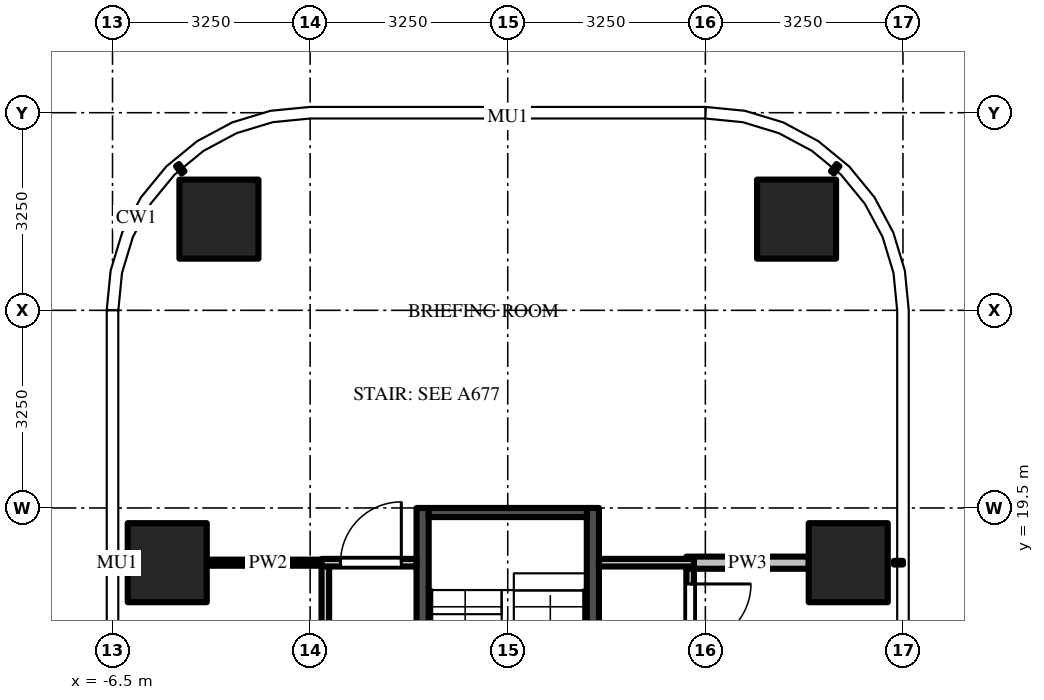
"""IFC4 building model, lengths in metres.
Left out: names, types, materials, properties, quantities, classifications, styles, units other than length and angle.
Written with IfcOpenShell. Run it as: python <this file> out.ifc"""

import sys

from ifc_helpers import new_model, si_unit, direction, frame, frame_2d, origin, origin_2d, place, context, subcontext, project, spatial, rectangle, extrude, source, transform, mapped, element, fill, save


model = new_model("IFC4")
c1 = context("Model", 3, precision=1e-05, world=origin(), true_north=direction((0.0, 1.0)))
c2 = subcontext(c1, "Body", "Model", "MODEL_VIEW")
j1 = project(units=[si_unit("LENGTHUNIT", "METRE"), si_unit("PLANEANGLEUNIT", "RADIAN")], contexts=[c1])
p1 = place(None, origin())
s1 = spatial("IfcSite", under=j1, at=p1, CompositionType="ELEMENT")
p2 = place(p1, origin())
s2 = spatial("IfcBuilding", under=s1, at=p2, CompositionType="ELEMENT")
p3 = place(p2, frame((0.0, 0.0, 97.5)))
s3 = spatial("IfcBuildingStorey", under=s2, at=p3, CompositionType="ELEMENT", Elevation=97.5)
m1 = source(origin(), c2, "Body", "SweptSolid", [
    extrude(rectangle(XDim=1.3, YDim=1.3, at=origin_2d()), origin(), (0.0, 0.0, 1.0), 4.5),
])
for number, where, z_axis, x_axis in (
    (1, (-5.6, 18.6, 0.0), (0.0, 0.0, 1.0), (1.0, 0.0, 0.0)),
    (2, (-4.75, 24.25, 0.0), (0.0, 0.0, 1.0), (1.0, 0.0, 0.0)),
    (3, (5.6, 18.6, 0.0), (0.0, 0.0, 1.0), (1.0, 0.0, 0.0)),
    (4, (4.75, 24.25, 0.0), (0.0, 0.0, 1.0), (1.0, 0.0, 0.0)),
):
    element("IfcColumn", number, at=place(p3, frame(where, z_axis=z_axis, x_axis=x_axis)), inside=s3, PredefinedType="COLUMN", context=c2, shape_type="MappedRepresentation", body=[
        mapped(m1, transform((0.0, 0.0, 0.0))),
    ])
m2 = source(origin(), c2, "Body", "SweptSolid", [
    extrude(rectangle(XDim=6.0, YDim=0.2, at=frame_2d((3.0, 0.0))), origin(), (0.0, 0.0, 1.0), 4.25),
])
for number, where, z_axis, x_axis in (
    (5, (-1.4, 13.5, 0.0), (0.0, 0.0, 1.0), (0.0, 1.0, 0.0)),
    (6, (1.4, 13.5, 0.0), (0.0, 0.0, 1.0), (0.0, 1.0, 0.0)),
):
    element("IfcWall", number, at=place(p3, frame(where, z_axis=z_axis, x_axis=x_axis)), inside=s3, PredefinedType="SHEAR", context=c2, shape_type="MappedRepresentation", body=[
        mapped(m2, transform((0.0, 0.0, 0.0))),
    ])
m3 = source(origin(), c2, "Body", "SweptSolid", [
    extrude(rectangle(XDim=2.6, YDim=0.15, at=frame_2d((1.3, 0.0))), origin(), (0.0, 0.0, 1.0), 4.25),
])
p4 = place(p3, frame((-1.3, 19.425, 0.0), z_axis=(0.0, 0.0, 1.0), x_axis=(1.0, 0.0, 0.0)))
e7 = element("IfcWall", 7, at=p4, inside=s3, PredefinedType="SHEAR", context=c2, shape_type="MappedRepresentation", body=[
    mapped(m3, transform((0.0, 0.0, 0.0))),
])
m4 = source(origin(), c2, "Body", "SweptSolid", [
    extrude(rectangle(XDim=6.387, YDim=0.125, at=frame_2d((3.194, 0.0))), origin(), (0.0, 0.0, 1.0), 3.468),
])
p5 = place(p3, frame((-3.0, 12.163, 0.0), z_axis=(0.0, 0.0, 1.0), x_axis=(0.0, 1.0, 0.0)))
e8 = element("IfcWall", 8, at=p5, inside=s3, PredefinedType="PARTITIONING", context=c2, shape_type="MappedRepresentation", body=[
    mapped(m4, transform((0.0, 0.0, 0.0))),
])
m5 = source(origin(), c2, "Body", "SweptSolid", [
    extrude(rectangle(XDim=6.3, YDim=0.125, at=frame_2d((3.15, 0.0))), origin(), (0.0, 0.0, 1.0), 3.468),
])
p6 = place(p3, frame((3.0, 18.5, 0.0), z_axis=(0.0, 0.0, 1.0), x_axis=(0.0, -1.0, 0.0)))
e9 = element("IfcWall", 9, at=p6, inside=s3, PredefinedType="PARTITIONING", context=c2, shape_type="MappedRepresentation", body=[
    mapped(m5, transform((0.0, 0.0, 0.0))),
])
m6 = source(origin(), c2, "Body", "SweptSolid", [
    extrude(rectangle(XDim=1.0, YDim=2.1, at=frame_2d((0.5, 1.05))), frame((0.0, 0.073, 0.0), z_axis=(0.0, -1.0, 0.0), x_axis=(1.0, 0.0, 0.0)), (0.0, 0.0, 1.0), 0.145),
])
p7 = place(p6, frame((0.25, 0.0, 0.0)))
e10 = element("IfcOpeningElement", 10, at=p7, cuts=e9, PredefinedType="OPENING", context=c2, shape_type="MappedRepresentation", body=[
    mapped(m6, transform((0.0, 0.0, 0.0))),
])
m7 = source(origin(), c2, "Body", "SweptSolid", [
    extrude(rectangle(XDim=2.012, YDim=0.2, at=frame_2d((1.006, 0.0))), origin(), (0.0, 0.0, 1.0), 3.697),
])
p8 = place(p3, frame((2.938, 18.6, 0.0), z_axis=(0.0, 0.0, 1.0), x_axis=(1.0, 0.0, 0.0)))
e11 = element("IfcWall", 11, at=p8, inside=s3, PredefinedType="PARTITIONING", context=c2, shape_type="MappedRepresentation", body=[
    mapped(m7, transform((0.0, 0.0, 0.0))),
])
m8 = source(origin(), c2, "Body", "SweptSolid", [
    extrude(rectangle(XDim=2.012, YDim=0.1, at=frame_2d((1.006, 0.0))), origin(), (0.0, 0.0, 1.0), 3.697),
])
p9 = place(p3, frame((-4.95, 18.6, 0.0), z_axis=(0.0, 0.0, 1.0), x_axis=(1.0, 0.0, 0.0)))
e12 = element("IfcWall", 12, at=p9, inside=s3, PredefinedType="PARTITIONING", context=c2, shape_type="MappedRepresentation", body=[
    mapped(m8, transform((0.0, 0.0, 0.0))),
])
m9 = source(origin(), c2, "Body", "SweptSolid", [
    extrude(rectangle(XDim=1.562, YDim=0.125, at=frame_2d((0.781, 0.0))), origin(), (0.0, 0.0, 1.0), 3.697),
])
p10 = place(p3, frame((-3.062, 18.6, 0.0), z_axis=(0.0, 0.0, 1.0), x_axis=(1.0, 0.0, 0.0)))
e13 = element("IfcWall", 13, at=p10, inside=s3, PredefinedType="PARTITIONING", context=c2, shape_type="MappedRepresentation", body=[
    mapped(m9, transform((0.0, 0.0, 0.0))),
])
p11 = place(p10, frame((0.312, 0.0, 0.0)))
e14 = element("IfcOpeningElement", 14, at=p11, cuts=e13, PredefinedType="OPENING", context=c2, shape_type="MappedRepresentation", body=[
    mapped(m6, transform((0.0, 0.0, 0.0))),
])
p12 = place(p3, frame((1.5, 18.6, 0.0), z_axis=(0.0, 0.0, 1.0), x_axis=(1.0, 0.0, 0.0)))
e15 = element("IfcWall", 15, at=p12, inside=s3, PredefinedType="PARTITIONING", context=c2, shape_type="MappedRepresentation", body=[
    mapped(m9, transform((0.0, 0.0, 0.0))),
])
m10 = source(origin(), c2, "Body", "SweptSolid", [
    extrude(rectangle(XDim=1.0, YDim=2.1, at=frame_2d((0.5, 1.05))), frame((0.0, 0.025, 0.0), z_axis=(0.0, -1.0, 0.0), x_axis=(1.0, 0.0, 0.0)), (0.0, 0.0, 1.0), 0.05),
])
p13 = place(p7, origin())
e16 = element("IfcDoor", 16, at=p13, inside=s3, OperationType="SINGLE_SWING_LEFT", PredefinedType="DOOR", context=c2, shape_type="MappedRepresentation", body=[
    mapped(m10, transform((0.0, 0.0, 0.0))),
])
fill(e10, e16)
p14 = place(p11, origin())
e17 = element("IfcDoor", 17, at=p14, inside=s3, OperationType="SINGLE_SWING_RIGHT", PredefinedType="DOOR", context=c2, shape_type="MappedRepresentation", body=[
    mapped(m10, transform((0.0, 0.0, 0.0))),
])
fill(e14, e17)
save(model, sys.argv[1])
